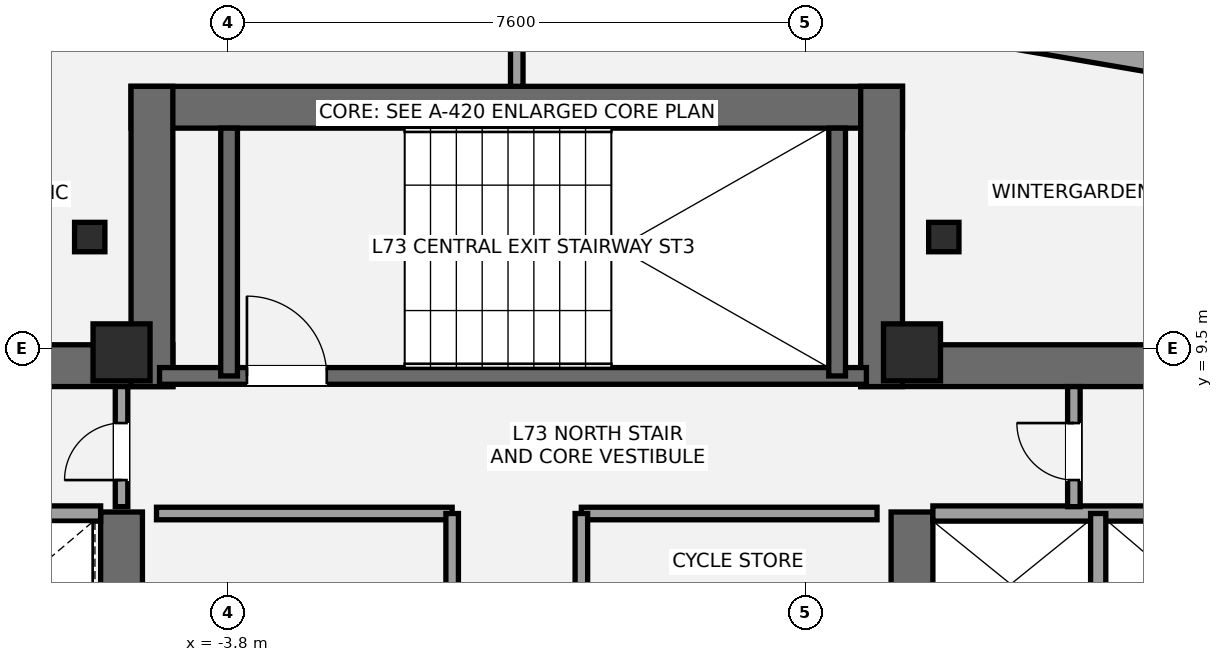
"""IFC4 building model, lengths in metres.
Left out: names, types, materials, properties, quantities, classifications, styles, units other than length and angle.
Written with IfcOpenShell. Run it as: python <this file> out.ifc"""

import sys

from ifc_helpers import new_model, si_unit, direction, frame, frame_2d, origin, origin_2d, place, context, subcontext, project, spatial, rectangle, i_section, extrude, element, fill, save


model = new_model("IFC4")
c1 = context("Model", 3, precision=1e-05, world=origin(), true_north=direction((0.0, 1.0)))
c2 = subcontext(c1, "Body", "Model", "MODEL_VIEW")
j1 = project(units=[si_unit("LENGTHUNIT", "METRE"), si_unit("PLANEANGLEUNIT", "RADIAN")], contexts=[c1])
p1 = place(None, origin())
s1 = spatial("IfcSite", under=j1, at=p1, CompositionType="ELEMENT")
p2 = place(p1, origin())
s2 = spatial("IfcBuilding", under=s1, at=p2, CompositionType="ELEMENT")
p3 = place(p2, frame((0.0, 0.0, 257.25)))
s3 = spatial("IfcBuildingStorey", under=s2, at=p3, CompositionType="ELEMENT", Elevation=257.25)
p4 = place(p3, frame((-13.7, 9.275, 0.0), z_axis=(0.0, 0.0, 1.0), x_axis=(1.0, 0.0, 0.0)))
e1 = element("IfcWall", 1, at=p4, inside=s3, PredefinedType="SHEAR", context=c2, shape_type="SweptSolid", body=[
    extrude(rectangle(XDim=9.175, YDim=0.55, at=frame_2d((4.587, 0.0))), origin(), (0.0, 0.0, 1.0), 3.15),
])
p5 = place(p3, frame((-5.2, 5.35, 0.0), z_axis=(0.0, 0.0, 1.0), x_axis=(0.0, 1.0, 0.0)))
e2 = element("IfcWall", 2, at=p5, inside=s3, PredefinedType="SHEAR", context=c2, shape_type="SweptSolid", body=[
    extrude(rectangle(XDim=2.0, YDim=0.55, at=frame_2d((1.0, 0.0))), origin(), (0.0, 0.0, 1.0), 3.15),
])
p6 = place(p3, frame((4.525, 9.275, 0.0), z_axis=(0.0, 0.0, 1.0), x_axis=(1.0, 0.0, 0.0)))
e3 = element("IfcWall", 3, at=p6, inside=s3, PredefinedType="SHEAR", context=c2, shape_type="SweptSolid", body=[
    extrude(rectangle(XDim=9.175, YDim=0.55, at=frame_2d((4.587, 0.0))), origin(), (0.0, 0.0, 1.0), 3.15),
])
p7 = place(p3, frame((5.2, 5.35, 0.0), z_axis=(0.0, 0.0, 1.0), x_axis=(0.0, 1.0, 0.0)))
e4 = element("IfcWall", 4, at=p7, inside=s3, PredefinedType="SHEAR", context=c2, shape_type="SweptSolid", body=[
    extrude(rectangle(XDim=2.0, YDim=0.55, at=frame_2d((1.0, 0.0))), origin(), (0.0, 0.0, 1.0), 3.15),
])
p8 = place(p3, frame((-5.075, 12.675, 0.0), z_axis=(0.0, 0.0, 1.0), x_axis=(1.0, 0.0, 0.0)))
e5 = element("IfcWall", 5, at=p8, inside=s3, PredefinedType="SHEAR", context=c2, shape_type="SweptSolid", body=[
    extrude(rectangle(XDim=10.15, YDim=0.55, at=frame_2d((5.075, 0.0))), origin(), (0.0, 0.0, 1.0), 3.15),
])
for number, where, z_axis, x_axis in (
    (6, (-4.8, 9.0, 0.0), (0.0, 0.0, 1.0), (0.0, 1.0, 0.0)),
    (7, (4.8, 9.0, 0.0), (0.0, 0.0, 1.0), (0.0, 1.0, 0.0)),
):
    element("IfcWall", number, at=place(p3, frame(where, z_axis=z_axis, x_axis=x_axis)), inside=s3, PredefinedType="SHEAR", context=c2, shape_type="SweptSolid", body=[
        extrude(rectangle(XDim=3.95, YDim=0.55, at=frame_2d((1.975, 0.0))), origin(), (0.0, 0.0, 1.0), 3.15),
    ])
p9 = place(p3, frame((-4.7, 9.14, 0.0), z_axis=(0.0, 0.0, 1.0), x_axis=(1.0, 0.0, 0.0)))
e8 = element("IfcWall", 8, at=p9, inside=s3, PredefinedType="SHEAR", context=c2, shape_type="SweptSolid", body=[
    extrude(rectangle(XDim=9.3, YDim=0.22, at=frame_2d((4.65, 0.0))), origin(), (0.0, 0.0, 1.0), 3.15),
])
p10 = place(p9, frame((1.15, 0.0, 0.0)))
e9 = element("IfcOpeningElement", 9, at=p10, cuts=e8, PredefinedType="OPENING", context=c2, shape_type="SweptSolid", body=[
    extrude(rectangle(XDim=1.05, YDim=2.15, at=frame_2d((0.525, 1.075))), frame((0.0, 0.12, 0.0), z_axis=(0.0, -1.0, 0.0), x_axis=(1.0, 0.0, 0.0)), (0.0, 0.0, 1.0), 0.24),
])
for number, where, z_axis, x_axis in (
    (10, (-3.785, 9.14, 0.0), (0.0, 0.0, 1.0), (0.0, 1.0, 0.0)),
    (11, (4.215, 9.14, 0.0), (0.0, 0.0, 1.0), (0.0, 1.0, 0.0)),
):
    element("IfcWall", number, at=place(p3, frame(where, z_axis=z_axis, x_axis=x_axis)), inside=s3, PredefinedType="SHEAR", context=c2, shape_type="SweptSolid", body=[
        extrude(rectangle(XDim=3.26, YDim=0.22, at=frame_2d((1.63, 0.0))), origin(), (0.0, 0.0, 1.0), 3.15),
    ])
for number, where, z_axis, x_axis in (
    (12, (-5.2, 9.45, 0.0), (0.0, 0.0, 1.0), (1.0, 0.0, 0.0)),
    (13, (5.2, 9.45, 0.0), (0.0, 0.0, 1.0), (1.0, 0.0, 0.0)),
):
    element("IfcColumn", number, at=place(p3, frame(where, z_axis=z_axis, x_axis=x_axis)), inside=s3, PredefinedType="PILASTER", context=c2, shape_type="SweptSolid", body=[
        extrude(rectangle(XDim=0.75, YDim=0.75, at=origin_2d()), origin(), (0.0, 0.0, 1.0), 3.15),
    ])
for number, where, z_axis, x_axis in (
    (14, (5.619, 10.967, 0.0), (0.0, 0.0, 1.0), (1.0, 0.0, 0.0)),
    (15, (-5.619, 10.967, 0.0), (0.0, 0.0, 1.0), (1.0, 0.0, 0.0)),
):
    element("IfcColumn", number, at=place(p3, frame(where, z_axis=z_axis, x_axis=x_axis)), inside=s3, PredefinedType="COLUMN", context=c2, shape_type="SweptSolid", body=[
        extrude(i_section(OverallWidth=0.399, OverallDepth=0.387, WebThickness=0.021, FlangeThickness=0.033, at=origin_2d()), origin(), (0.0, 0.0, 1.0), 3.15),
    ])
p11 = place(p3, frame((6.2, 13.723, 0.0), z_axis=(0.0, 0.0, 1.0), x_axis=(0.985667057966, -0.168702254995, 0.0)))
e16 = element("IfcWall", 16, at=p11, inside=s3, PredefinedType="STANDARD", context=c2, shape_type="SweptSolid", body=[
    extrude(rectangle(XDim=4.249, YDim=0.44, at=frame_2d((2.125, 0.0))), origin(), (0.0, 0.0, 1.0), 2.296),
])
p12 = place(p11, frame((2.849, 0.0, 0.58)))
e17 = element("IfcOpeningElement", 17, at=p12, cuts=e16, PredefinedType="OPENING", context=c2, shape_type="SweptSolid", body=[
    extrude(rectangle(XDim=0.9, YDim=1.35, at=frame_2d((0.45, 0.675))), frame((0.0, 0.23, 0.0), z_axis=(0.0, -1.0, 0.0), x_axis=(1.0, 0.0, 0.0)), (0.0, 0.0, 1.0), 0.46),
])
for number, where, z_axis, x_axis in (
    (18, (-9.78, 7.33, 0.0), (0.0, 0.0, 1.0), (1.0, 0.0, 0.0)),
    (19, (5.475, 7.33, 0.0), (0.0, 0.0, 1.0), (1.0, 0.0, 0.0)),
):
    element("IfcWall", number, at=place(p3, frame(where, z_axis=z_axis, x_axis=x_axis)), inside=s3, PredefinedType="SOLIDWALL", context=c2, shape_type="SweptSolid", body=[
        extrude(rectangle(XDim=4.305, YDim=0.2, at=frame_2d((2.152, 0.0))), origin(), (0.0, 0.0, 1.0), 2.93),
    ])
p13 = place(p3, frame((7.65, 5.47, 0.0), z_axis=(0.0, 0.0, 1.0), x_axis=(0.0, 1.0, 0.0)))
e20 = element("IfcWall", 20, at=p13, inside=s3, PredefinedType="SOLIDWALL", context=c2, shape_type="SweptSolid", body=[
    extrude(rectangle(XDim=1.86, YDim=0.2, at=frame_2d((0.93, 0.0))), origin(), (0.0, 0.0, 1.0), 2.93),
])
p14 = place(p3, frame((-4.74, 7.33, 0.0), z_axis=(0.0, 0.0, 1.0), x_axis=(1.0, 0.0, 0.0)))
e21 = element("IfcWall", 21, at=p14, inside=s3, PredefinedType="PARTITIONING", context=c2, shape_type="SweptSolid", body=[
    extrude(rectangle(XDim=3.89, YDim=0.165, at=frame_2d((1.945, 0.0))), origin(), (0.0, 0.0, 1.0), 2.93),
])
p15 = place(p3, frame((-0.85, 5.52, 0.0), z_axis=(0.0, 0.0, 1.0), x_axis=(0.0, 1.0, 0.0)))
e22 = element("IfcWall", 22, at=p15, inside=s3, PredefinedType="PARTITIONING", context=c2, shape_type="SweptSolid", body=[
    extrude(rectangle(XDim=1.81, YDim=0.165, at=frame_2d((0.905, 0.0))), origin(), (0.0, 0.0, 1.0), 2.93),
])
p16 = place(p3, frame((0.85, 7.33, 0.0), z_axis=(0.0, 0.0, 1.0), x_axis=(1.0, 0.0, 0.0)))
e23 = element("IfcWall", 23, at=p16, inside=s3, PredefinedType="PARTITIONING", context=c2, shape_type="SweptSolid", body=[
    extrude(rectangle(XDim=3.89, YDim=0.165, at=frame_2d((1.945, 0.0))), origin(), (0.0, 0.0, 1.0), 2.93),
])
p17 = place(p3, frame((0.85, 5.52, 0.0), z_axis=(0.0, 0.0, 1.0), x_axis=(0.0, 1.0, 0.0)))
e24 = element("IfcWall", 24, at=p17, inside=s3, PredefinedType="PARTITIONING", context=c2, shape_type="SweptSolid", body=[
    extrude(rectangle(XDim=1.81, YDim=0.165, at=frame_2d((0.905, 0.0))), origin(), (0.0, 0.0, 1.0), 2.93),
])
p18 = place(p3, frame((-5.2, 7.42, 0.0), z_axis=(0.0, 0.0, 1.0), x_axis=(0.0, 1.0, 0.0)))
e25 = element("IfcWall", 25, at=p18, inside=s3, PredefinedType="PARTITIONING", context=c2, shape_type="SweptSolid", body=[
    extrude(rectangle(XDim=1.58, YDim=0.165, at=frame_2d((0.79, 0.0))), origin(), (0.0, 0.0, 1.0), 2.93),
])
p19 = place(p18, frame((0.35, 0.0, 0.0)))
e26 = element("IfcOpeningElement", 26, at=p19, cuts=e25, PredefinedType="OPENING", context=c2, shape_type="SweptSolid", body=[
    extrude(rectangle(XDim=0.75, YDim=2.1, at=frame_2d((0.375, 1.05))), frame((0.0, 0.093, 0.0), z_axis=(0.0, -1.0, 0.0), x_axis=(1.0, 0.0, 0.0)), (0.0, 0.0, 1.0), 0.185),
])
p20 = place(p3, frame((7.33, 7.42, 0.0), z_axis=(0.0, 0.0, 1.0), x_axis=(0.0, 1.0, 0.0)))
e27 = element("IfcWall", 27, at=p20, inside=s3, PredefinedType="PARTITIONING", context=c2, shape_type="SweptSolid", body=[
    extrude(rectangle(XDim=1.58, YDim=0.165, at=frame_2d((0.79, 0.0))), origin(), (0.0, 0.0, 1.0), 2.93),
])
p21 = place(p20, frame((0.35, 0.0, 0.0)))
e28 = element("IfcOpeningElement", 28, at=p21, cuts=e27, PredefinedType="OPENING", context=c2, shape_type="SweptSolid", body=[
    extrude(rectangle(XDim=0.75, YDim=2.1, at=frame_2d((0.375, 1.05))), frame((0.0, 0.093, 0.0), z_axis=(0.0, -1.0, 0.0), x_axis=(1.0, 0.0, 0.0)), (0.0, 0.0, 1.0), 0.185),
])
p22 = place(p3, frame((0.0, 12.95, 0.0), z_axis=(0.0, 0.0, 1.0), x_axis=(0.0, 1.0, 0.0)))
e29 = element("IfcWall", 29, at=p22, inside=s3, PredefinedType="PARTITIONING", context=c2, shape_type="SweptSolid", body=[
    extrude(rectangle(XDim=0.766, YDim=0.165, at=frame_2d((0.383, 0.0))), origin(), (0.0, 0.0, 1.0), 2.93),
])
p23 = place(p10, origin())
e30 = element("IfcDoor", 30, at=p23, inside=s3, OperationType="SINGLE_SWING_LEFT", PredefinedType="DOOR", context=c2, shape_type="SweptSolid", body=[
    extrude(rectangle(XDim=1.05, YDim=2.15, at=frame_2d((0.525, 1.075))), frame((0.0, 0.025, 0.0), z_axis=(0.0, -1.0, 0.0), x_axis=(1.0, 0.0, 0.0)), (0.0, 0.0, 1.0), 0.05),
])
fill(e9, e30)
p24 = place(p19, origin())
e31 = element("IfcDoor", 31, at=p24, inside=s3, OperationType="SINGLE_SWING_LEFT", PredefinedType="DOOR", context=c2, shape_type="SweptSolid", body=[
    extrude(rectangle(XDim=0.75, YDim=2.1, at=frame_2d((0.375, 1.05))), frame((0.0, 0.025, 0.0), z_axis=(0.0, -1.0, 0.0), x_axis=(1.0, 0.0, 0.0)), (0.0, 0.0, 1.0), 0.05),
])
fill(e26, e31)
p25 = place(p21, origin())
e32 = element("IfcDoor", 32, at=p25, inside=s3, OperationType="SINGLE_SWING_RIGHT", PredefinedType="DOOR", context=c2, shape_type="SweptSolid", body=[
    extrude(rectangle(XDim=0.75, YDim=2.1, at=frame_2d((0.375, 1.05))), frame((0.0, 0.025, 0.0), z_axis=(0.0, -1.0, 0.0), x_axis=(1.0, 0.0, 0.0)), (0.0, 0.0, 1.0), 0.05),
])
fill(e28, e32)
save(model, sys.argv[1])
